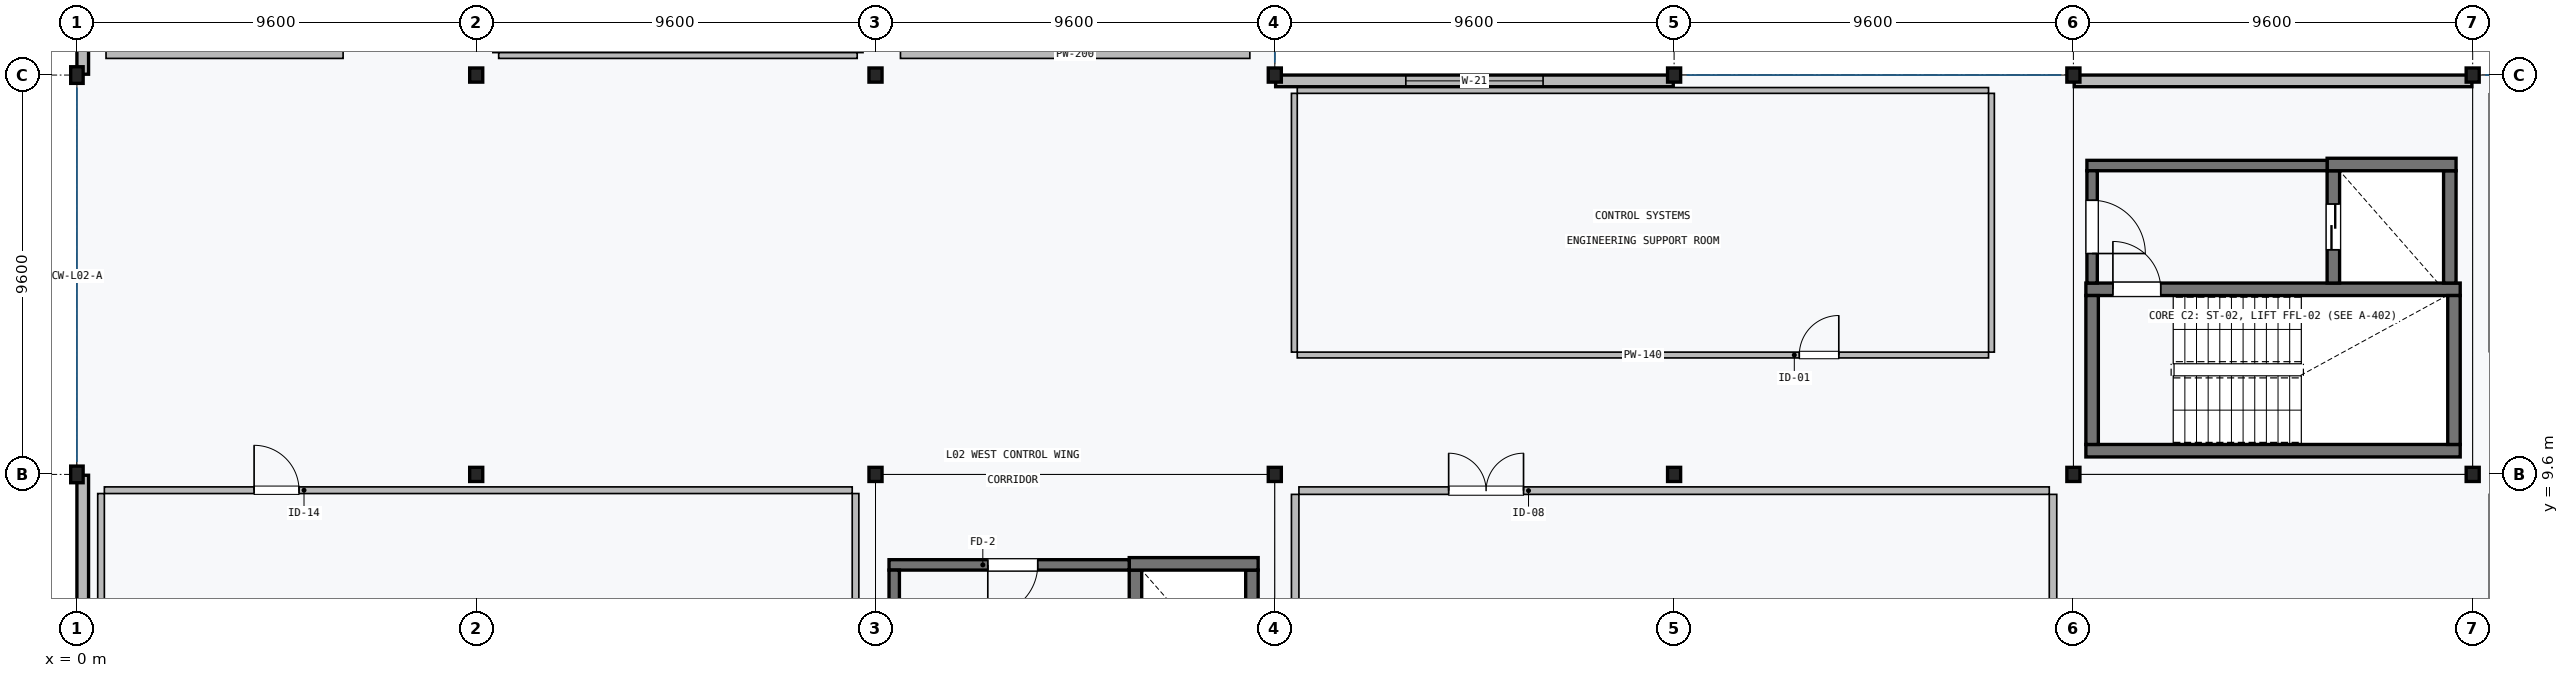
"""IFC4 building model, lengths in metres.
Left out: names, types, materials, properties, quantities, classifications, styles, units other than length and angle.
Written with IfcOpenShell. Run it as: python <this file> out.ifc"""

import sys

from ifc_helpers import new_model, si_unit, direction, frame, frame_2d, origin, origin_2d, place, context, subcontext, project, spatial, rectangle, i_section, extrude, element, fill, save


model = new_model("IFC4")
c1 = context("Model", 3, precision=1e-05, world=origin(), true_north=direction((0.0, 1.0)))
c2 = subcontext(c1, "Body", "Model", "MODEL_VIEW")
j1 = project(units=[si_unit("LENGTHUNIT", "METRE"), si_unit("PLANEANGLEUNIT", "RADIAN")], contexts=[c1])
p1 = place(None, origin())
s1 = spatial("IfcSite", under=j1, at=p1, CompositionType="ELEMENT")
p2 = place(p1, origin())
s2 = spatial("IfcBuilding", under=s1, at=p2, CompositionType="ELEMENT")
p3 = place(p2, frame((0.0, 0.0, 10.5)))
s3 = spatial("IfcBuildingStorey", under=s2, at=p3, CompositionType="ELEMENT", Elevation=10.5)
for number, where, z_axis, x_axis in (
    (1, (0.0, 9.6, 0.0), (0.0, 0.0, 1.0), (1.0, 0.0, 0.0)),
    (2, (0.0, 19.2, 0.0), (0.0, 0.0, 1.0), (1.0, 0.0, 0.0)),
):
    element("IfcColumn", number, at=place(p3, frame(where, z_axis=z_axis, x_axis=x_axis)), inside=s3, PredefinedType="COLUMN", context=c2, shape_type="SweptSolid", body=[
        extrude(i_section(OverallWidth=0.3, OverallDepth=0.4, WebThickness=0.013, FlangeThickness=0.024, FilletRadius=0.027, at=origin_2d()), origin(), (0.0, 0.0, 1.0), 3.95),
    ])
for number, where, z_axis, x_axis in (
    (3, (9.6, 9.6, 0.0), (0.0, 0.0, 1.0), (1.0, 0.0, 0.0)),
    (4, (9.6, 19.2, 0.0), (0.0, 0.0, 1.0), (1.0, 0.0, 0.0)),
    (5, (19.2, 9.6, 0.0), (0.0, 0.0, 1.0), (1.0, 0.0, 0.0)),
    (6, (19.2, 19.2, 0.0), (0.0, 0.0, 1.0), (1.0, 0.0, 0.0)),
    (7, (28.8, 9.6, 0.0), (0.0, 0.0, 1.0), (1.0, 0.0, 0.0)),
    (8, (28.8, 19.2, 0.0), (0.0, 0.0, 1.0), (1.0, 0.0, 0.0)),
    (9, (38.4, 9.6, 0.0), (0.0, 0.0, 1.0), (1.0, 0.0, 0.0)),
    (10, (38.4, 19.2, 0.0), (0.0, 0.0, 1.0), (1.0, 0.0, 0.0)),
    (11, (48.0, 9.6, 0.0), (0.0, 0.0, 1.0), (1.0, 0.0, 0.0)),
    (12, (48.0, 19.2, 0.0), (0.0, 0.0, 1.0), (1.0, 0.0, 0.0)),
    (13, (57.6, 9.6, 0.0), (0.0, 0.0, 1.0), (1.0, 0.0, 0.0)),
    (14, (57.6, 19.2, 0.0), (0.0, 0.0, 1.0), (1.0, 0.0, 0.0)),
):
    element("IfcColumn", number, at=place(p3, frame(where, z_axis=z_axis, x_axis=x_axis)), inside=s3, PredefinedType="COLUMN", context=c2, shape_type="SweptSolid", body=[
        extrude(i_section(OverallWidth=0.314, OverallDepth=0.34, WebThickness=0.019, FlangeThickness=0.031, FilletRadius=0.015, at=origin_2d()), origin(), (0.0, 0.0, 1.0), 3.95),
    ])
p4 = place(p3, frame((48.3, 10.17, 0.0), z_axis=(0.0, 0.0, 1.0), x_axis=(1.0, 0.0, 0.0)))
e15 = element("IfcWall", 15, at=p4, inside=s3, PredefinedType="SHEAR", context=c2, shape_type="SweptSolid", body=[
    extrude(rectangle(XDim=9.0, YDim=0.3, at=frame_2d((4.5, 0.0))), origin(), (0.0, 0.0, 1.0), 3.95),
])
p5 = place(p3, frame((57.3, 14.05, 0.0), z_axis=(0.0, 0.0, 1.0), x_axis=(-1.0, 0.0, 0.0)))
e16 = element("IfcWall", 16, at=p5, inside=s3, PredefinedType="SHEAR", context=c2, shape_type="SweptSolid", body=[
    extrude(rectangle(XDim=9.0, YDim=0.3, at=frame_2d((4.5, 0.0))), origin(), (0.0, 0.0, 1.0), 3.95),
])
p6 = place(p5, frame((7.2, 0.0, 0.0)))
e17 = element("IfcOpeningElement", 17, at=p6, cuts=e16, PredefinedType="OPENING", context=c2, shape_type="SweptSolid", body=[
    extrude(rectangle(XDim=1.15, YDim=2.15, at=frame_2d((0.575, 1.075))), frame((0.0, 0.16, 0.0), z_axis=(0.0, -1.0, 0.0), x_axis=(1.0, 0.0, 0.0)), (0.0, 0.0, 1.0), 0.32),
])
for number, where, z_axis, x_axis in (
    (18, (48.45, 10.32, 0.0), (0.0, 0.0, 1.0), (0.0, 1.0, 0.0)),
    (19, (57.15, 13.9, 0.0), (0.0, 0.0, 1.0), (0.0, -1.0, 0.0)),
):
    element("IfcWall", number, at=place(p3, frame(where, z_axis=z_axis, x_axis=x_axis)), inside=s3, PredefinedType="SHEAR", context=c2, shape_type="SweptSolid", body=[
        extrude(rectangle(XDim=3.58, YDim=0.3, at=frame_2d((1.79, 0.0))), origin(), (0.0, 0.0, 1.0), 3.95),
    ])
p7 = place(p3, frame((54.25, 16.9, 0.0), z_axis=(0.0, 0.0, 1.0), x_axis=(0.0, -1.0, 0.0)))
e20 = element("IfcWall", 20, at=p7, inside=s3, PredefinedType="SHEAR", context=c2, shape_type="SweptSolid", body=[
    extrude(rectangle(XDim=2.7, YDim=0.3, at=frame_2d((1.35, 0.0))), origin(), (0.0, 0.0, 1.0), 3.95),
])
p8 = place(p7, frame((0.8, 0.0, 0.0)))
e21 = element("IfcOpeningElement", 21, at=p8, cuts=e20, PredefinedType="OPENING", context=c2, shape_type="SweptSolid", body=[
    extrude(rectangle(XDim=1.1, YDim=2.1, at=frame_2d((0.55, 1.05))), frame((0.0, 0.16, 0.0), z_axis=(0.0, -1.0, 0.0), x_axis=(1.0, 0.0, 0.0)), (0.0, 0.0, 1.0), 0.32),
])
p9 = place(p3, frame((57.05, 14.2, 0.0), z_axis=(0.0, 0.0, 1.0), x_axis=(0.0, 1.0, 0.0)))
e22 = element("IfcWall", 22, at=p9, inside=s3, PredefinedType="SHEAR", context=c2, shape_type="SweptSolid", body=[
    extrude(rectangle(XDim=2.7, YDim=0.3, at=frame_2d((1.35, 0.0))), origin(), (0.0, 0.0, 1.0), 3.95),
])
p10 = place(p3, frame((54.1, 17.05, 0.0), z_axis=(0.0, 0.0, 1.0), x_axis=(1.0, 0.0, 0.0)))
e23 = element("IfcWall", 23, at=p10, inside=s3, PredefinedType="SHEAR", context=c2, shape_type="SweptSolid", body=[
    extrude(rectangle(XDim=3.1, YDim=0.3, at=frame_2d((1.55, 0.0))), origin(), (0.0, 0.0, 1.0), 3.95),
])
p11 = place(p3, frame((54.1, 17.025, 0.0), z_axis=(0.0, 0.0, 1.0), x_axis=(-1.0, 0.0, 0.0)))
e24 = element("IfcWall", 24, at=p11, inside=s3, PredefinedType="SHEAR", context=c2, shape_type="SweptSolid", body=[
    extrude(rectangle(XDim=5.775, YDim=0.25, at=frame_2d((2.888, 0.0))), origin(), (0.0, 0.0, 1.0), 3.95),
])
p12 = place(p3, frame((48.45, 14.2, 0.0), z_axis=(0.0, 0.0, 1.0), x_axis=(0.0, 1.0, 0.0)))
e25 = element("IfcWall", 25, at=p12, inside=s3, PredefinedType="SHEAR", context=c2, shape_type="SweptSolid", body=[
    extrude(rectangle(XDim=2.7, YDim=0.25, at=frame_2d((1.35, 0.0))), origin(), (0.0, 0.0, 1.0), 3.95),
])
p13 = place(p12, frame((0.71, 0.0, 0.0)))
e26 = element("IfcOpeningElement", 26, at=p13, cuts=e25, PredefinedType="OPENING", context=c2, shape_type="SweptSolid", body=[
    extrude(rectangle(XDim=1.28, YDim=2.2, at=frame_2d((0.64, 1.1))), frame((0.0, 0.135, 0.0), z_axis=(0.0, -1.0, 0.0), x_axis=(1.0, 0.0, 0.0)), (0.0, 0.0, 1.0), 0.27),
])
p14 = place(p3, frame((25.45, 7.3, 0.0), z_axis=(0.0, 0.0, 1.0), x_axis=(0.0, -1.0, 0.0)))
e27 = element("IfcWall", 27, at=p14, inside=s3, PredefinedType="SHEAR", context=c2, shape_type="SweptSolid", body=[
    extrude(rectangle(XDim=2.7, YDim=0.3, at=frame_2d((1.35, 0.0))), origin(), (0.0, 0.0, 1.0), 3.95),
])
p15 = place(p14, frame((0.775, 0.0, 0.0)))
e28 = element("IfcOpeningElement", 28, at=p15, cuts=e27, PredefinedType="OPENING", context=c2, shape_type="SweptSolid", body=[
    extrude(rectangle(XDim=1.15, YDim=2.1, at=frame_2d((0.575, 1.05))), frame((0.0, 0.16, 0.0), z_axis=(0.0, -1.0, 0.0), x_axis=(1.0, 0.0, 0.0)), (0.0, 0.0, 1.0), 0.32),
])
p16 = place(p3, frame((28.25, 4.6, 0.0), z_axis=(0.0, 0.0, 1.0), x_axis=(0.0, 1.0, 0.0)))
e29 = element("IfcWall", 29, at=p16, inside=s3, PredefinedType="SHEAR", context=c2, shape_type="SweptSolid", body=[
    extrude(rectangle(XDim=2.7, YDim=0.3, at=frame_2d((1.35, 0.0))), origin(), (0.0, 0.0, 1.0), 3.95),
])
p17 = place(p3, frame((25.3, 7.45, 0.0), z_axis=(0.0, 0.0, 1.0), x_axis=(1.0, 0.0, 0.0)))
e30 = element("IfcWall", 30, at=p17, inside=s3, PredefinedType="SHEAR", context=c2, shape_type="SweptSolid", body=[
    extrude(rectangle(XDim=3.1, YDim=0.3, at=frame_2d((1.55, 0.0))), origin(), (0.0, 0.0, 1.0), 3.95),
])
p18 = place(p3, frame((25.3, 7.425, 0.0), z_axis=(0.0, 0.0, 1.0), x_axis=(-1.0, 0.0, 0.0)))
e31 = element("IfcWall", 31, at=p18, inside=s3, PredefinedType="SHEAR", context=c2, shape_type="SweptSolid", body=[
    extrude(rectangle(XDim=5.775, YDim=0.25, at=frame_2d((2.888, 0.0))), origin(), (0.0, 0.0, 1.0), 3.95),
])
p19 = place(p18, frame((2.2, 0.0, 0.0)))
e32 = element("IfcOpeningElement", 32, at=p19, cuts=e31, PredefinedType="OPENING", context=c2, shape_type="SweptSolid", body=[
    extrude(rectangle(XDim=1.2, YDim=2.15, at=frame_2d((0.6, 1.075))), frame((0.0, 0.135, 0.0), z_axis=(0.0, -1.0, 0.0), x_axis=(1.0, 0.0, 0.0)), (0.0, 0.0, 1.0), 0.27),
])
p20 = place(p3, frame((19.65, 4.6, 0.0), z_axis=(0.0, 0.0, 1.0), x_axis=(0.0, 1.0, 0.0)))
e33 = element("IfcWall", 33, at=p20, inside=s3, PredefinedType="SHEAR", context=c2, shape_type="SweptSolid", body=[
    extrude(rectangle(XDim=2.7, YDim=0.25, at=frame_2d((1.35, 0.0))), origin(), (0.0, 0.0, 1.0), 3.95),
])
p21 = place(p3, frame((0.14, 0.02, 0.0), z_axis=(0.0, 0.0, 1.0), x_axis=(0.0, 1.0, 0.0)))
e34 = element("IfcWall", 34, at=p21, inside=s3, PredefinedType="SOLIDWALL", context=c2, shape_type="SweptSolid", body=[
    extrude(rectangle(XDim=9.56, YDim=0.28, at=frame_2d((4.78, 0.0))), origin(), (0.0, 0.0, 1.0), 3.493),
])
p22 = place(p21, frame((3.58, 0.0, 1.3)))
e35 = element("IfcOpeningElement", 35, at=p22, cuts=e34, PredefinedType="OPENING", context=c2, shape_type="SweptSolid", body=[
    extrude(rectangle(XDim=2.4, YDim=1.05, at=frame_2d((1.2, 0.525))), frame((0.0, 0.15, 0.0), z_axis=(0.0, -1.0, 0.0), x_axis=(1.0, 0.0, 0.0)), (0.0, 0.0, 1.0), 0.3),
])
p23 = place(p3, frame((0.14, 19.22, 0.0), z_axis=(0.0, 0.0, 1.0), x_axis=(0.0, 1.0, 0.0)))
e36 = element("IfcWall", 36, at=p23, inside=s3, PredefinedType="SOLIDWALL", context=c2, shape_type="SweptSolid", body=[
    extrude(rectangle(XDim=9.56, YDim=0.28, at=frame_2d((4.78, 0.0))), origin(), (0.0, 0.0, 1.0), 3.493),
])
p24 = place(p3, frame((28.82, 19.06, 0.0), z_axis=(0.0, 0.0, 1.0), x_axis=(1.0, 0.0, 0.0)))
e37 = element("IfcWall", 37, at=p24, inside=s3, PredefinedType="SOLIDWALL", context=c2, shape_type="SweptSolid", body=[
    extrude(rectangle(XDim=9.56, YDim=0.28, at=frame_2d((4.78, 0.0))), origin(), (0.0, 0.0, 1.0), 3.66),
])
p25 = place(p24, frame((3.13, 0.0, 0.9)))
e38 = element("IfcOpeningElement", 38, at=p25, cuts=e37, PredefinedType="OPENING", context=c2, shape_type="SweptSolid", body=[
    extrude(rectangle(XDim=3.3, YDim=2.1, at=frame_2d((1.65, 1.05))), frame((0.0, 0.15, 0.0), z_axis=(0.0, -1.0, 0.0), x_axis=(1.0, 0.0, 0.0)), (0.0, 0.0, 1.0), 0.3),
])
p26 = place(p3, frame((48.02, 19.06, 0.0), z_axis=(0.0, 0.0, 1.0), x_axis=(1.0, 0.0, 0.0)))
e39 = element("IfcWall", 39, at=p26, inside=s3, PredefinedType="SOLIDWALL", context=c2, shape_type="SweptSolid", body=[
    extrude(rectangle(XDim=9.56, YDim=0.28, at=frame_2d((4.78, 0.0))), origin(), (0.0, 0.0, 1.0), 3.66),
])
p27 = place(p3, frame((29.38, 9.21, 0.0), z_axis=(0.0, 0.0, 1.0), x_axis=(1.0, 0.0, 0.0)))
e40 = element("IfcWall", 40, at=p27, inside=s3, PredefinedType="PARTITIONING", context=c2, shape_type="SweptSolid", body=[
    extrude(rectangle(XDim=18.04, YDim=0.18, at=frame_2d((9.02, 0.0))), origin(), (0.0, 0.0, 1.0), 3.483),
])
p28 = place(p27, frame((3.6, 0.0, 0.0)))
e41 = element("IfcOpeningElement", 41, at=p28, cuts=e40, PredefinedType="OPENING", context=c2, shape_type="SweptSolid", body=[
    extrude(rectangle(XDim=1.8, YDim=2.35, at=frame_2d((0.9, 1.175))), frame((0.0, 0.1, 0.0), z_axis=(0.0, -1.0, 0.0), x_axis=(1.0, 0.0, 0.0)), (0.0, 0.0, 1.0), 0.2),
])
for number, where, z_axis, x_axis in (
    (42, (29.29, 0.68, 0.0), (0.0, 0.0, 1.0), (0.0, 1.0, 0.0)),
    (43, (47.51, 9.12, 0.0), (0.0, 0.0, 1.0), (0.0, -1.0, 0.0)),
):
    element("IfcWall", number, at=place(p3, frame(where, z_axis=z_axis, x_axis=x_axis)), inside=s3, PredefinedType="PARTITIONING", context=c2, shape_type="SweptSolid", body=[
        extrude(rectangle(XDim=8.44, YDim=0.18, at=frame_2d((4.22, 0.0))), origin(), (0.0, 0.0, 1.0), 3.59),
    ])
p29 = place(p3, frame((0.66, 9.22, 0.0), z_axis=(0.0, 0.0, 1.0), x_axis=(1.0, 0.0, 0.0)))
e44 = element("IfcWall", 44, at=p29, inside=s3, PredefinedType="PARTITIONING", context=c2, shape_type="SweptSolid", body=[
    extrude(rectangle(XDim=17.98, YDim=0.16, at=frame_2d((8.99, 0.0))), origin(), (0.0, 0.0, 1.0), 3.483),
])
p30 = place(p29, frame((3.6, 0.0, 0.0)))
e45 = element("IfcOpeningElement", 45, at=p30, cuts=e44, PredefinedType="OPENING", context=c2, shape_type="SweptSolid", body=[
    extrude(rectangle(XDim=1.08, YDim=2.2, at=frame_2d((0.54, 1.1))), frame((0.0, 0.09, 0.0), z_axis=(0.0, -1.0, 0.0), x_axis=(1.0, 0.0, 0.0)), (0.0, 0.0, 1.0), 0.18),
])
for number, where, z_axis, x_axis in (
    (46, (0.58, 0.66, 0.0), (0.0, 0.0, 1.0), (0.0, 1.0, 0.0)),
    (47, (18.72, 9.14, 0.0), (0.0, 0.0, 1.0), (0.0, -1.0, 0.0)),
):
    element("IfcWall", number, at=place(p3, frame(where, z_axis=z_axis, x_axis=x_axis)), inside=s3, PredefinedType="PARTITIONING", context=c2, shape_type="SweptSolid", body=[
        extrude(rectangle(XDim=8.48, YDim=0.16, at=frame_2d((4.24, 0.0))), origin(), (0.0, 0.0, 1.0), 3.59),
    ])
p31 = place(p3, frame((45.96, 12.47, 0.0), z_axis=(0.0, 0.0, 1.0), x_axis=(-1.0, 0.0, 0.0)))
e48 = element("IfcWall", 48, at=p31, inside=s3, PredefinedType="PARTITIONING", context=c2, shape_type="SweptSolid", body=[
    extrude(rectangle(XDim=16.62, YDim=0.14, at=frame_2d((8.31, 0.0))), origin(), (0.0, 0.0, 1.0), 3.483),
])
p32 = place(p31, frame((3.6, 0.0, 0.0)))
e49 = element("IfcOpeningElement", 49, at=p32, cuts=e48, PredefinedType="OPENING", context=c2, shape_type="SweptSolid", body=[
    extrude(rectangle(XDim=0.95, YDim=2.15, at=frame_2d((0.475, 1.075))), frame((0.0, 0.08, 0.0), z_axis=(0.0, -1.0, 0.0), x_axis=(1.0, 0.0, 0.0)), (0.0, 0.0, 1.0), 0.16),
])
p33 = place(p3, frame((29.34, 18.83, 0.0), z_axis=(0.0, 0.0, 1.0), x_axis=(1.0, 0.0, 0.0)))
e50 = element("IfcWall", 50, at=p33, inside=s3, PredefinedType="PARTITIONING", context=c2, shape_type="SweptSolid", body=[
    extrude(rectangle(XDim=16.62, YDim=0.14, at=frame_2d((8.31, 0.0))), origin(), (0.0, 0.0, 1.0), 3.483),
])
for number, where, z_axis, x_axis in (
    (51, (29.27, 12.54, 0.0), (0.0, 0.0, 1.0), (0.0, 1.0, 0.0)),
    (52, (46.03, 18.76, 0.0), (0.0, 0.0, 1.0), (0.0, -1.0, 0.0)),
):
    element("IfcWall", number, at=place(p3, frame(where, z_axis=z_axis, x_axis=x_axis)), inside=s3, PredefinedType="PARTITIONING", context=c2, shape_type="SweptSolid", body=[
        extrude(rectangle(XDim=6.22, YDim=0.14, at=frame_2d((3.11, 0.0))), origin(), (0.0, 0.0, 1.0), 3.59),
    ])
p34 = place(p3, frame((28.2, 19.7, 0.0), z_axis=(0.0, 0.0, 1.0), x_axis=(-1.0, 0.0, 0.0)))
e53 = element("IfcWall", 53, at=p34, inside=s3, PredefinedType="PARTITIONING", context=c2, shape_type="SweptSolid", body=[
    extrude(rectangle(XDim=8.4, YDim=0.2, at=frame_2d((4.2, 0.0))), origin(), (0.0, 0.0, 1.0), 3.59),
])
p35 = place(p3, frame((6.4, 19.7, 0.0), z_axis=(0.0, 0.0, 1.0), x_axis=(-1.0, 0.0, 0.0)))
e54 = element("IfcWall", 54, at=p35, inside=s3, PredefinedType="PARTITIONING", context=c2, shape_type="SweptSolid", body=[
    extrude(rectangle(XDim=5.7, YDim=0.2, at=frame_2d((2.85, 0.0))), origin(), (0.0, 0.0, 1.0), 3.59),
])
p36 = place(p3, frame((18.76, 19.67, 0.0), z_axis=(0.0, 0.0, 1.0), x_axis=(-1.0, 0.0, 0.0)))
e55 = element("IfcWall", 55, at=p36, inside=s3, PredefinedType="PARTITIONING", context=c2, shape_type="SweptSolid", body=[
    extrude(rectangle(XDim=8.62, YDim=0.14, at=frame_2d((4.31, 0.0))), origin(), (0.0, 0.0, 1.0), 3.59),
])
p37 = place(p6, frame((1.15, 0.0, 0.0), z_axis=(0.0, 0.0, 1.0), x_axis=(-1.0, 0.0, 0.0)))
e56 = element("IfcDoor", 56, at=p37, inside=s3, OperationType="SINGLE_SWING_RIGHT", PredefinedType="DOOR", context=c2, shape_type="SweptSolid", body=[
    extrude(rectangle(XDim=1.15, YDim=2.15, at=frame_2d((0.575, 1.075))), frame((0.0, 0.025, 0.0), z_axis=(0.0, -1.0, 0.0), x_axis=(1.0, 0.0, 0.0)), (0.0, 0.0, 1.0), 0.05),
])
fill(e17, e56)
p38 = place(p8, frame((1.1, 0.0, 0.0), z_axis=(0.0, 0.0, 1.0), x_axis=(-1.0, 0.0, 0.0)))
e57 = element("IfcDoor", 57, at=p38, inside=s3, OperationType="DOUBLE_DOOR_SLIDING", PredefinedType="DOOR", context=c2, shape_type="SweptSolid", body=[
    extrude(rectangle(XDim=1.1, YDim=2.1, at=frame_2d((0.55, 1.05))), frame((0.0, 0.025, 0.0), z_axis=(0.0, -1.0, 0.0), x_axis=(1.0, 0.0, 0.0)), (0.0, 0.0, 1.0), 0.05),
])
fill(e21, e57)
p39 = place(p13, frame((1.28, 0.0, 0.0), z_axis=(0.0, 0.0, 1.0), x_axis=(-1.0, 0.0, 0.0)))
e58 = element("IfcDoor", 58, at=p39, inside=s3, OperationType="SINGLE_SWING_LEFT", PredefinedType="DOOR", context=c2, shape_type="SweptSolid", body=[
    extrude(rectangle(XDim=1.28, YDim=2.2, at=frame_2d((0.64, 1.1))), frame((0.0, 0.025, 0.0), z_axis=(0.0, -1.0, 0.0), x_axis=(1.0, 0.0, 0.0)), (0.0, 0.0, 1.0), 0.05),
])
fill(e26, e58)
p40 = place(p19, origin())
e59 = element("IfcDoor", 59, at=p40, inside=s3, OperationType="SINGLE_SWING_RIGHT", PredefinedType="DOOR", context=c2, shape_type="SweptSolid", body=[
    extrude(rectangle(XDim=1.2, YDim=2.15, at=frame_2d((0.6, 1.075))), frame((0.0, 0.025, 0.0), z_axis=(0.0, -1.0, 0.0), x_axis=(1.0, 0.0, 0.0)), (0.0, 0.0, 1.0), 0.05),
])
fill(e32, e59)
p41 = place(p25, origin())
e60 = element("IfcWindow", 60, at=p41, inside=s3, PartitioningType="SINGLE_PANEL", PredefinedType="WINDOW", context=c2, shape_type="SweptSolid", body=[
    extrude(rectangle(XDim=3.3, YDim=2.1, at=frame_2d((1.65, 1.05))), frame((0.0, 0.03, 0.0), z_axis=(0.0, -1.0, 0.0), x_axis=(1.0, 0.0, 0.0)), (0.0, 0.0, 1.0), 0.06),
])
fill(e38, e60)
p42 = place(p28, origin())
e61 = element("IfcDoor", 61, at=p42, inside=s3, OperationType="DOUBLE_DOOR_SINGLE_SWING", PredefinedType="DOOR", context=c2, shape_type="SweptSolid", body=[
    extrude(rectangle(XDim=1.8, YDim=2.35, at=frame_2d((0.9, 1.175))), frame((0.0, 0.025, 0.0), z_axis=(0.0, -1.0, 0.0), x_axis=(1.0, 0.0, 0.0)), (0.0, 0.0, 1.0), 0.05),
])
fill(e41, e61)
p43 = place(p30, origin())
e62 = element("IfcDoor", 62, at=p43, inside=s3, OperationType="SINGLE_SWING_LEFT", PredefinedType="DOOR", context=c2, shape_type="SweptSolid", body=[
    extrude(rectangle(XDim=1.08, YDim=2.2, at=frame_2d((0.54, 1.1))), frame((0.0, 0.025, 0.0), z_axis=(0.0, -1.0, 0.0), x_axis=(1.0, 0.0, 0.0)), (0.0, 0.0, 1.0), 0.05),
])
fill(e45, e62)
p44 = place(p32, frame((0.95, 0.0, 0.0), z_axis=(0.0, 0.0, 1.0), x_axis=(-1.0, 0.0, 0.0)))
e63 = element("IfcDoor", 63, at=p44, inside=s3, OperationType="SINGLE_SWING_LEFT", PredefinedType="DOOR", context=c2, shape_type="SweptSolid", body=[
    extrude(rectangle(XDim=0.95, YDim=2.15, at=frame_2d((0.475, 1.075))), frame((0.0, 0.025, 0.0), z_axis=(0.0, -1.0, 0.0), x_axis=(1.0, 0.0, 0.0)), (0.0, 0.0, 1.0), 0.05),
])
fill(e49, e63)
save(model, sys.argv[1])
